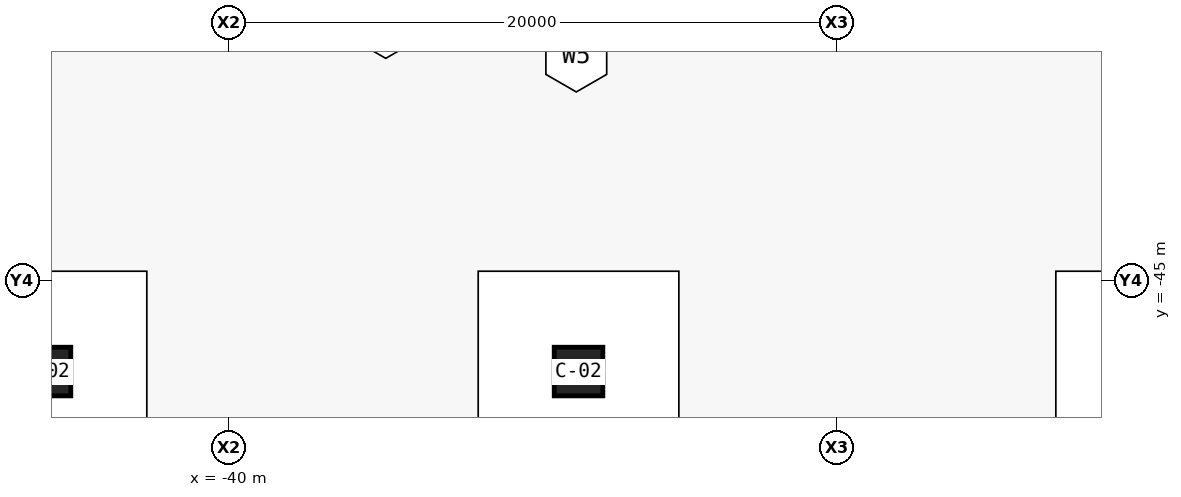
"""IFC4 building model, lengths in metres.
Left out: names, types, materials, properties, quantities, classifications, styles, units other than length and angle.
Written with IfcOpenShell. Run it as: python <this file> out.ifc"""

import sys

from ifc_helpers import new_model, si_unit, direction, frame, origin, origin_2d, place, context, subcontext, project, spatial, rectangle, extrude, element, save


model = new_model("IFC4")
c1 = context("Model", 3, precision=1e-05, world=origin(), true_north=direction((0.0, 1.0)))
c2 = subcontext(c1, "Body", "Model", "MODEL_VIEW")
j1 = project(units=[si_unit("LENGTHUNIT", "METRE"), si_unit("PLANEANGLEUNIT", "RADIAN")], contexts=[c1])
p1 = place(None, origin())
s1 = spatial("IfcSite", under=j1, at=p1, CompositionType="ELEMENT")
p2 = place(p1, origin())
s2 = spatial("IfcBuilding", under=s1, at=p2, CompositionType="ELEMENT")
p3 = place(p2, frame((0.0, 0.0, -9.0)))
s3 = spatial("IfcBuildingStorey", under=s2, at=p3, CompositionType="ELEMENT", Elevation=-9.0)
for number, where, z_axis, x_axis in (
    (1, (-46.0, -48.0, 0.0), (0.0, 0.0, 1.0), (1.0, 0.0, 0.0)),
    (2, (-28.5, -48.0, 0.0), (0.0, 0.0, 1.0), (1.0, 0.0, 0.0)),
):
    element("IfcColumn", number, at=place(p3, frame(where, z_axis=z_axis, x_axis=x_axis)), inside=s3, PredefinedType="COLUMN", context=c2, shape_type="SweptSolid", body=[
        extrude(rectangle(XDim=1.6, YDim=1.6, at=origin_2d()), origin(), (0.0, 0.0, 1.0), 4.5),
    ])
save(model, sys.argv[1])
